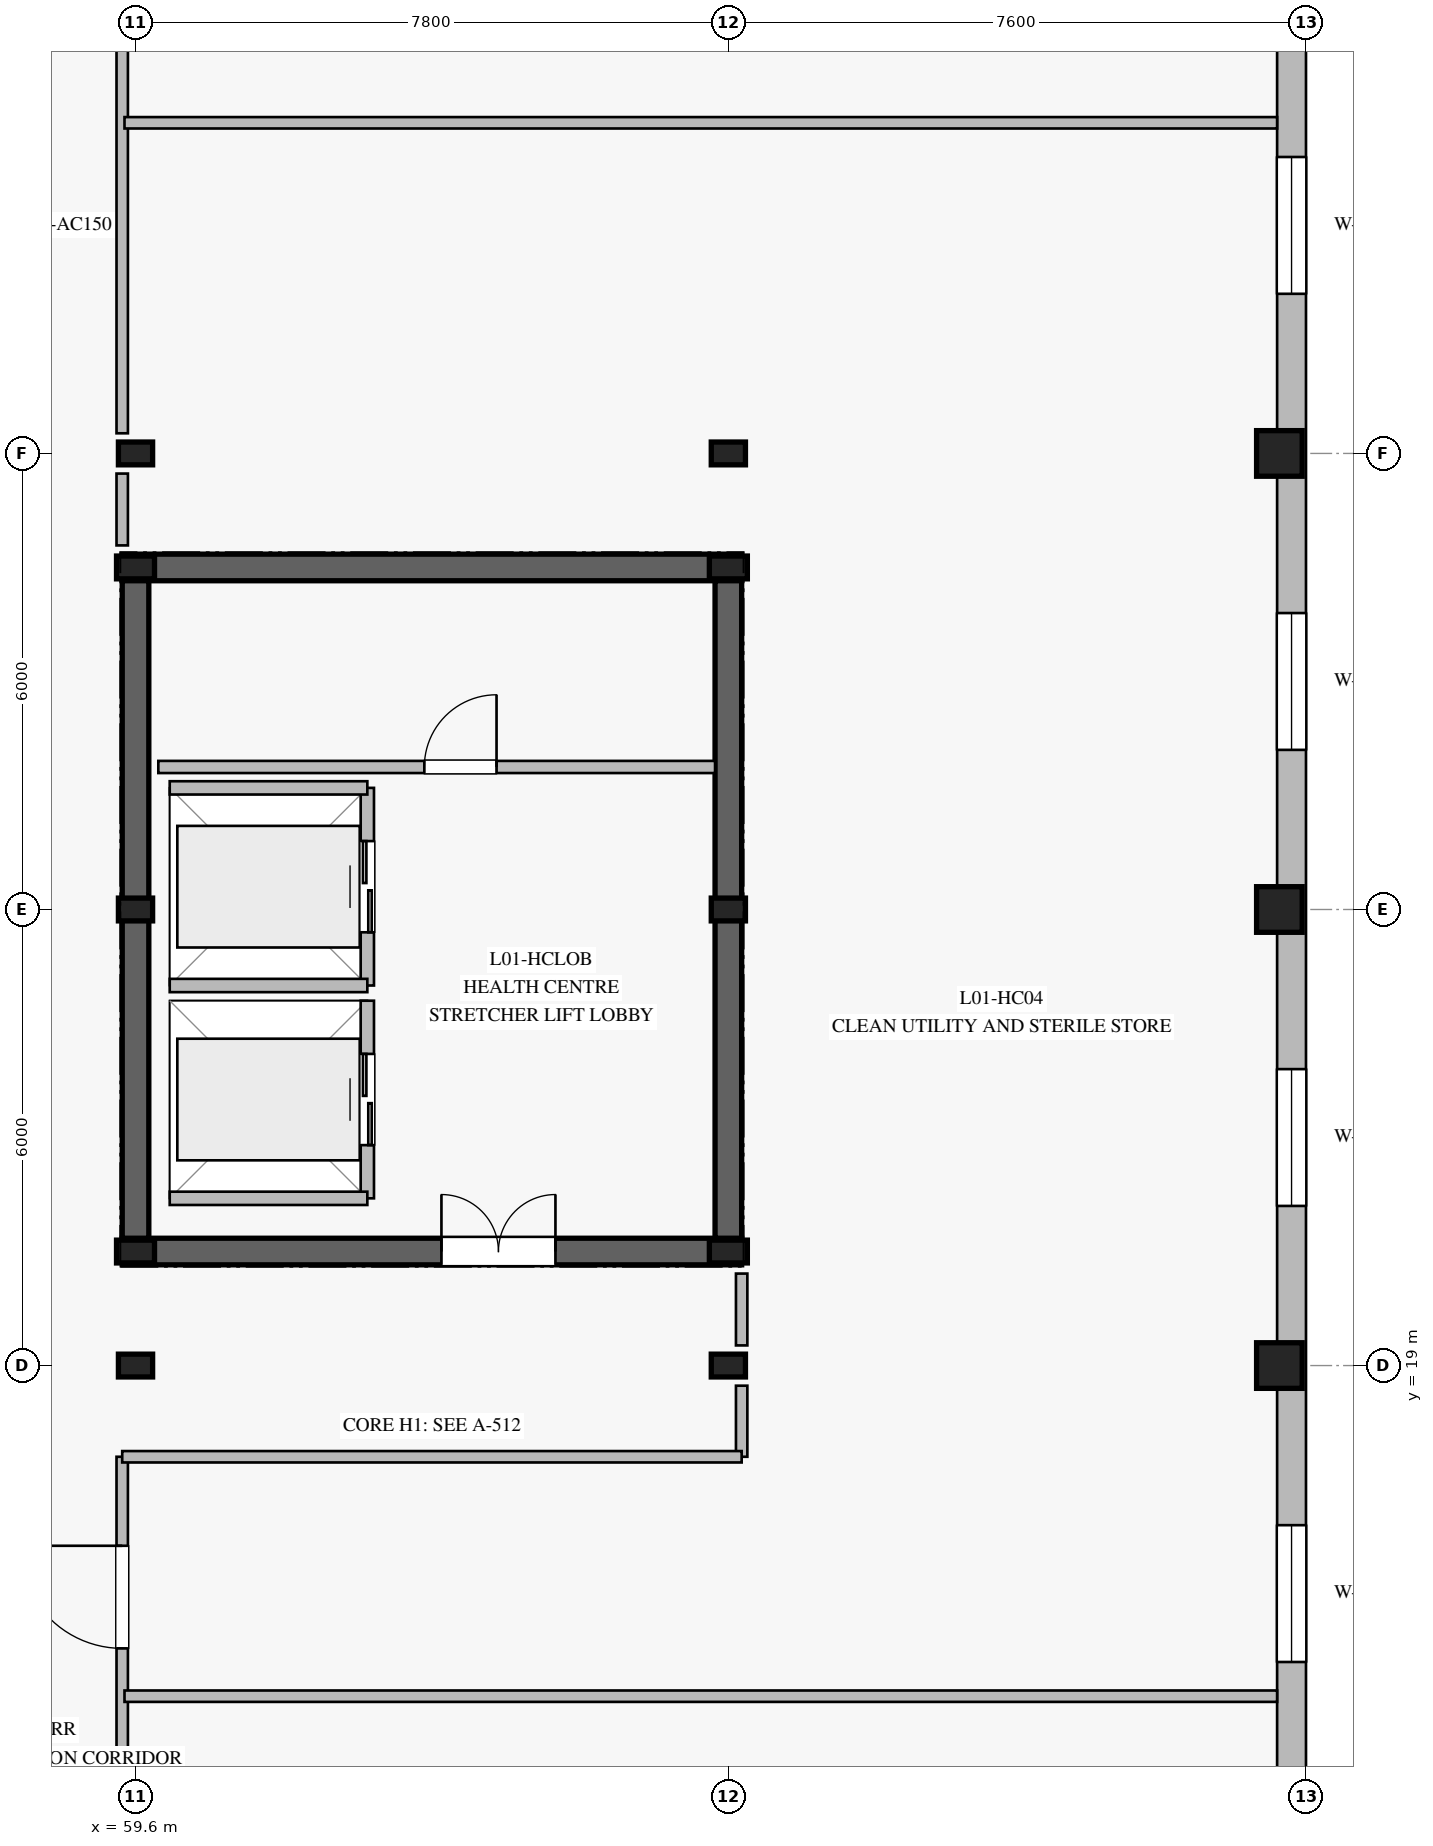
"""IFC4 building model, lengths in metres.
Left out: names, types, materials, properties, quantities, classifications, styles, units other than length and angle.
Written with IfcOpenShell. Run it as: python <this file> out.ifc"""

import sys

from ifc_helpers import new_model, si_unit, direction, frame, frame_2d, origin, origin_2d, place, context, subcontext, project, spatial, rectangle, i_section, extrude, element, fill, save


model = new_model("IFC4")
c1 = context("Model", 3, precision=1e-05, world=origin(), true_north=direction((0.0, 1.0)))
c2 = subcontext(c1, "Body", "Model", "MODEL_VIEW")
j1 = project(units=[si_unit("LENGTHUNIT", "METRE"), si_unit("PLANEANGLEUNIT", "RADIAN")], contexts=[c1])
p1 = place(None, origin())
s1 = spatial("IfcSite", under=j1, at=p1, CompositionType="ELEMENT")
p2 = place(p1, origin())
s2 = spatial("IfcBuilding", under=s1, at=p2, CompositionType="ELEMENT")
p3 = place(p2, frame((0.0, 0.0, 5.2)))
s3 = spatial("IfcBuildingStorey", under=s2, at=p3, CompositionType="ELEMENT", Elevation=5.2)
p4 = place(p3, frame((59.425, 20.5, 0.0), z_axis=(0.0, 0.0, 1.0), x_axis=(1.0, 0.0, 0.0)))
e1 = element("IfcWall", 1, at=p4, inside=s3, PredefinedType="SHEAR", context=c2, shape_type="SweptSolid", body=[
    extrude(rectangle(XDim=8.15, YDim=0.35, at=frame_2d((4.075, 0.0))), origin(), (0.0, 0.0, 1.0), 4.34),
])
p5 = place(p4, frame((4.2, 0.0, 0.0)))
e2 = element("IfcOpeningElement", 2, at=p5, cuts=e1, PredefinedType="OPENING", context=c2, shape_type="SweptSolid", body=[
    extrude(rectangle(XDim=1.5, YDim=2.2, at=frame_2d((0.75, 1.1))), frame((0.0, 0.185, 0.0), z_axis=(0.0, -1.0, 0.0), x_axis=(1.0, 0.0, 0.0)), (0.0, 0.0, 1.0), 0.37),
])
p6 = place(p3, frame((67.575, 29.5, 0.0), z_axis=(0.0, 0.0, 1.0), x_axis=(-1.0, 0.0, 0.0)))
e3 = element("IfcWall", 3, at=p6, inside=s3, PredefinedType="SHEAR", context=c2, shape_type="SweptSolid", body=[
    extrude(rectangle(XDim=8.15, YDim=0.35, at=frame_2d((4.075, 0.0))), origin(), (0.0, 0.0, 1.0), 4.34),
])
for number, where, z_axis, x_axis in (
    (4, (59.6, 29.325, 0.0), (0.0, 0.0, 1.0), (0.0, -1.0, 0.0)),
    (5, (67.4, 20.675, 0.0), (0.0, 0.0, 1.0), (0.0, 1.0, 0.0)),
):
    element("IfcWall", number, at=place(p3, frame(where, z_axis=z_axis, x_axis=x_axis)), inside=s3, PredefinedType="SHEAR", context=c2, shape_type="SweptSolid", body=[
        extrude(rectangle(XDim=8.65, YDim=0.35, at=frame_2d((4.325, 0.0))), origin(), (0.0, 0.0, 1.0), 4.34),
    ])
for number, where, z_axis, x_axis in (
    (6, (59.6, 20.5, 0.0), (0.0, 0.0, 1.0), (1.0, 0.0, 0.0)),
    (7, (67.4, 20.5, 0.0), (0.0, 0.0, 1.0), (1.0, 0.0, 0.0)),
    (8, (67.4, 29.5, 0.0), (0.0, 0.0, 1.0), (1.0, 0.0, 0.0)),
    (9, (59.6, 29.5, 0.0), (0.0, 0.0, 1.0), (1.0, 0.0, 0.0)),
):
    element("IfcColumn", number, at=place(p3, frame(where, z_axis=z_axis, x_axis=x_axis)), inside=s3, PredefinedType="COLUMN", context=c2, shape_type="SweptSolid", body=[
        extrude(i_section(OverallWidth=0.3, OverallDepth=0.5, WebThickness=0.014, FlangeThickness=0.028, at=origin_2d()), origin(), (0.0, 0.0, 1.0), 4.6),
    ])
for number, where, z_axis, x_axis in (
    (10, (59.6, 19.0, 0.0), (0.0, 0.0, 1.0), (1.0, 0.0, 0.0)),
    (11, (59.6, 25.0, 0.0), (0.0, 0.0, 1.0), (1.0, 0.0, 0.0)),
    (12, (59.6, 31.0, 0.0), (0.0, 0.0, 1.0), (1.0, 0.0, 0.0)),
    (13, (67.4, 19.0, 0.0), (0.0, 0.0, 1.0), (1.0, 0.0, 0.0)),
    (14, (67.4, 25.0, 0.0), (0.0, 0.0, 1.0), (1.0, 0.0, 0.0)),
    (15, (67.4, 31.0, 0.0), (0.0, 0.0, 1.0), (1.0, 0.0, 0.0)),
):
    element("IfcColumn", number, at=place(p3, frame(where, z_axis=z_axis, x_axis=x_axis)), inside=s3, PredefinedType="COLUMN", context=c2, shape_type="SweptSolid", body=[
        extrude(i_section(OverallWidth=0.3, OverallDepth=0.45, WebThickness=0.014, FlangeThickness=0.026, at=origin_2d()), origin(), (0.0, 0.0, 1.0), 4.6),
    ])
for number, where, z_axis, x_axis in (
    (16, (74.65, 19.0, 0.0), (0.0, 0.0, 1.0), (1.0, 0.0, 0.0)),
    (17, (74.65, 25.0, 0.0), (0.0, 0.0, 1.0), (1.0, 0.0, 0.0)),
    (18, (74.65, 31.0, 0.0), (0.0, 0.0, 1.0), (1.0, 0.0, 0.0)),
):
    element("IfcColumn", number, at=place(p3, frame(where, z_axis=z_axis, x_axis=x_axis)), inside=s3, PredefinedType="COLUMN", context=c2, shape_type="SweptSolid", body=[
        extrude(rectangle(XDim=0.6, YDim=0.6, at=origin_2d()), origin(), (0.0, 0.0, 1.0), 4.6),
    ])
p7 = place(p3, frame((74.81, 42.62, 0.0), z_axis=(0.0, 0.0, 1.0), x_axis=(0.0, -1.0, 0.0)))
e19 = element("IfcWall", 19, at=p7, inside=s3, PredefinedType="STANDARD", context=c2, shape_type="SweptSolid", body=[
    extrude(rectangle(XDim=35.24, YDim=0.38, at=frame_2d((17.62, 0.0))), origin(), (0.0, 0.0, 1.0), 4.34),
])
p8 = place(p7, frame((31.52, 0.0, 0.9)))
e20 = element("IfcOpeningElement", 20, at=p8, cuts=e19, PredefinedType="OPENING", context=c2, shape_type="SweptSolid", body=[
    extrude(rectangle(XDim=1.8, YDim=1.8, at=frame_2d((0.9, 0.9))), frame((0.0, 0.2, 0.0), z_axis=(0.0, -1.0, 0.0), x_axis=(1.0, 0.0, 0.0)), (0.0, 0.0, 1.0), 0.4),
])
p9 = place(p7, frame((25.72, 0.0, 0.9)))
e21 = element("IfcOpeningElement", 21, at=p9, cuts=e19, PredefinedType="OPENING", context=c2, shape_type="SweptSolid", body=[
    extrude(rectangle(XDim=1.8, YDim=1.8, at=frame_2d((0.9, 0.9))), frame((0.0, 0.2, 0.0), z_axis=(0.0, -1.0, 0.0), x_axis=(1.0, 0.0, 0.0)), (0.0, 0.0, 1.0), 0.4),
])
p10 = place(p7, frame((19.72, 0.0, 0.9)))
e22 = element("IfcOpeningElement", 22, at=p10, cuts=e19, PredefinedType="OPENING", context=c2, shape_type="SweptSolid", body=[
    extrude(rectangle(XDim=1.8, YDim=1.8, at=frame_2d((0.9, 0.9))), frame((0.0, 0.2, 0.0), z_axis=(0.0, -1.0, 0.0), x_axis=(1.0, 0.0, 0.0)), (0.0, 0.0, 1.0), 0.4),
])
p11 = place(p7, frame((13.72, 0.0, 0.9)))
e23 = element("IfcOpeningElement", 23, at=p11, cuts=e19, PredefinedType="OPENING", context=c2, shape_type="SweptSolid", body=[
    extrude(rectangle(XDim=1.8, YDim=1.8, at=frame_2d((0.9, 0.9))), frame((0.0, 0.2, 0.0), z_axis=(0.0, -1.0, 0.0), x_axis=(1.0, 0.0, 0.0)), (0.0, 0.0, 1.0), 0.4),
])
p12 = place(p7, frame((7.72, 0.0, 0.9)))
e24 = element("IfcOpeningElement", 24, at=p12, cuts=e19, PredefinedType="OPENING", context=c2, shape_type="SweptSolid", body=[
    extrude(rectangle(XDim=1.8, YDim=1.8, at=frame_2d((0.9, 0.9))), frame((0.0, 0.2, 0.0), z_axis=(0.0, -1.0, 0.0), x_axis=(1.0, 0.0, 0.0)), (0.0, 0.0, 1.0), 0.4),
])
p13 = place(p7, frame((1.92, 0.0, 0.9)))
e25 = element("IfcOpeningElement", 25, at=p13, cuts=e19, PredefinedType="OPENING", context=c2, shape_type="SweptSolid", body=[
    extrude(rectangle(XDim=1.8, YDim=1.8, at=frame_2d((0.9, 0.9))), frame((0.0, 0.2, 0.0), z_axis=(0.0, -1.0, 0.0), x_axis=(1.0, 0.0, 0.0)), (0.0, 0.0, 1.0), 0.4),
])
p14 = place(p3, frame((62.65, 21.2, 0.0), z_axis=(0.0, 0.0, 1.0), x_axis=(0.0, 1.0, 0.0)))
e26 = element("IfcWall", 26, at=p14, inside=s3, PredefinedType="PARTITIONING", context=c2, shape_type="SweptSolid", body=[
    extrude(rectangle(XDim=2.6, YDim=0.175, at=frame_2d((1.3, 0.0))), origin(), (0.0, 0.0, 1.0), 4.34),
])
p15 = place(p14, frame((0.7, 0.0, 0.0)))
e27 = element("IfcOpeningElement", 27, at=p15, cuts=e26, PredefinedType="OPENING", context=c2, shape_type="SweptSolid", body=[
    extrude(rectangle(XDim=1.2, YDim=2.2, at=frame_2d((0.6, 1.1))), frame((0.0, 0.098, 0.0), z_axis=(0.0, -1.0, 0.0), x_axis=(1.0, 0.0, 0.0)), (0.0, 0.0, 1.0), 0.195),
])
p16 = place(p3, frame((60.05, 21.2, 0.0), z_axis=(0.0, 0.0, 1.0), x_axis=(1.0, 0.0, 0.0)))
e28 = element("IfcWall", 28, at=p16, inside=s3, PredefinedType="PARTITIONING", context=c2, shape_type="SweptSolid", body=[
    extrude(rectangle(XDim=2.6, YDim=0.175, at=frame_2d((1.3, 0.0))), origin(), (0.0, 0.0, 1.0), 4.34),
])
p17 = place(p3, frame((62.65, 24.0, 0.0), z_axis=(0.0, 0.0, 1.0), x_axis=(0.0, 1.0, 0.0)))
e29 = element("IfcWall", 29, at=p17, inside=s3, PredefinedType="PARTITIONING", context=c2, shape_type="SweptSolid", body=[
    extrude(rectangle(XDim=2.6, YDim=0.175, at=frame_2d((1.3, 0.0))), origin(), (0.0, 0.0, 1.0), 3.98),
])
p18 = place(p17, frame((0.7, 0.0, 0.0)))
e30 = element("IfcOpeningElement", 30, at=p18, cuts=e29, PredefinedType="OPENING", context=c2, shape_type="SweptSolid", body=[
    extrude(rectangle(XDim=1.2, YDim=2.2, at=frame_2d((0.6, 1.1))), frame((0.0, 0.098, 0.0), z_axis=(0.0, -1.0, 0.0), x_axis=(1.0, 0.0, 0.0)), (0.0, 0.0, 1.0), 0.195),
])
for number, where, z_axis, x_axis in (
    (31, (60.05, 24.0, 0.0), (0.0, 0.0, 1.0), (1.0, 0.0, 0.0)),
    (32, (60.05, 26.6, 0.0), (0.0, 0.0, 1.0), (1.0, 0.0, 0.0)),
):
    element("IfcWall", number, at=place(p3, frame(where, z_axis=z_axis, x_axis=x_axis)), inside=s3, PredefinedType="PARTITIONING", context=c2, shape_type="SweptSolid", body=[
        extrude(rectangle(XDim=2.6, YDim=0.175, at=frame_2d((1.3, 0.0))), origin(), (0.0, 0.0, 1.0), 4.34),
    ])
p19 = place(p3, frame((59.9, 26.875, 0.0), z_axis=(0.0, 0.0, 1.0), x_axis=(1.0, 0.0, 0.0)))
e33 = element("IfcWall", 33, at=p19, inside=s3, PredefinedType="PLUMBINGWALL", context=c2, shape_type="SweptSolid", body=[
    extrude(rectangle(XDim=7.325, YDim=0.16, at=frame_2d((3.663, 0.0))), origin(), (0.0, 0.0, 1.0), 3.98),
])
p20 = place(p19, frame((3.5, 0.0, 0.0)))
e34 = element("IfcOpeningElement", 34, at=p20, cuts=e33, PredefinedType="OPENING", context=c2, shape_type="SweptSolid", body=[
    extrude(rectangle(XDim=0.95, YDim=2.1, at=frame_2d((0.475, 1.05))), frame((0.0, 0.09, 0.0), z_axis=(0.0, -1.0, 0.0), x_axis=(1.0, 0.0, 0.0)), (0.0, 0.0, 1.0), 0.18),
])
p21 = place(p3, frame((59.425, 13.265, 0.0), z_axis=(0.0, 0.0, 1.0), x_axis=(0.0, 1.0, 0.0)))
e35 = element("IfcWall", 35, at=p21, inside=s3, PredefinedType="PARTITIONING", context=c2, shape_type="SweptSolid", body=[
    extrude(rectangle(XDim=4.535, YDim=0.15, at=frame_2d((2.268, 0.0))), origin(), (0.0, 0.0, 1.0), 3.98),
])
p22 = place(p21, frame((2.014, 0.0, 0.0)))
e36 = element("IfcOpeningElement", 36, at=p22, cuts=e35, PredefinedType="OPENING", context=c2, shape_type="SweptSolid", body=[
    extrude(rectangle(XDim=1.35, YDim=2.2, at=frame_2d((0.675, 1.1))), frame((0.0, 0.085, 0.0), z_axis=(0.0, -1.0, 0.0), x_axis=(1.0, 0.0, 0.0)), (0.0, 0.0, 1.0), 0.17),
])
p23 = place(p3, frame((59.425, 29.79, 0.0), z_axis=(0.0, 0.0, 1.0), x_axis=(0.0, 1.0, 0.0)))
e37 = element("IfcWall", 37, at=p23, inside=s3, PredefinedType="PARTITIONING", context=c2, shape_type="SweptSolid", body=[
    extrude(rectangle(XDim=0.945, YDim=0.15, at=frame_2d((0.473, 0.0))), origin(), (0.0, 0.0, 1.0), 3.98),
])
p24 = place(p3, frame((59.425, 31.265, 0.0), z_axis=(0.0, 0.0, 1.0), x_axis=(0.0, 1.0, 0.0)))
e38 = element("IfcWall", 38, at=p24, inside=s3, PredefinedType="PARTITIONING", context=c2, shape_type="SweptSolid", body=[
    extrude(rectangle(XDim=5.47, YDim=0.15, at=frame_2d((2.735, 0.0))), origin(), (0.0, 0.0, 1.0), 3.98),
])
p25 = place(p3, frame((67.575, 17.8, 0.0), z_axis=(0.0, 0.0, 1.0), x_axis=(0.0, 1.0, 0.0)))
e39 = element("IfcWall", 39, at=p25, inside=s3, PredefinedType="PARTITIONING", context=c2, shape_type="SweptSolid", body=[
    extrude(rectangle(XDim=0.935, YDim=0.15, at=frame_2d((0.468, 0.0))), origin(), (0.0, 0.0, 1.0), 3.98),
])
p26 = place(p3, frame((67.575, 19.265, 0.0), z_axis=(0.0, 0.0, 1.0), x_axis=(0.0, 1.0, 0.0)))
e40 = element("IfcWall", 40, at=p26, inside=s3, PredefinedType="PARTITIONING", context=c2, shape_type="SweptSolid", body=[
    extrude(rectangle(XDim=0.945, YDim=0.15, at=frame_2d((0.473, 0.0))), origin(), (0.0, 0.0, 1.0), 3.98),
])
p27 = place(p3, frame((59.425, 17.8, 0.0), z_axis=(0.0, 0.0, 1.0), x_axis=(1.0, 0.0, 0.0)))
e41 = element("IfcWall", 41, at=p27, inside=s3, PredefinedType="PARTITIONING", context=c2, shape_type="SweptSolid", body=[
    extrude(rectangle(XDim=8.15, YDim=0.15, at=frame_2d((4.075, 0.0))), origin(), (0.0, 0.0, 1.0), 3.98),
])
for number, where, z_axis, x_axis in (
    (42, (59.455, 14.65, 0.0), (0.0, 0.0, 1.0), (1.0, 0.0, 0.0)),
    (43, (59.455, 35.35, 0.0), (0.0, 0.0, 1.0), (1.0, 0.0, 0.0)),
):
    element("IfcWall", number, at=place(p3, frame(where, z_axis=z_axis, x_axis=x_axis)), inside=s3, PredefinedType="PARTITIONING", context=c2, shape_type="SweptSolid", body=[
        extrude(rectangle(XDim=15.165, YDim=0.15, at=frame_2d((7.583, 0.0))), origin(), (0.0, 0.0, 1.0), 3.98),
    ])
p28 = place(p9, origin())
e44 = element("IfcWindow", 44, at=p28, inside=s3, PartitioningType="DOUBLE_PANEL_VERTICAL", PredefinedType="WINDOW", context=c2, shape_type="SweptSolid", body=[
    extrude(rectangle(XDim=1.8, YDim=1.8, at=frame_2d((0.9, 0.9))), frame((0.0, 0.03, 0.0), z_axis=(0.0, -1.0, 0.0), x_axis=(1.0, 0.0, 0.0)), (0.0, 0.0, 1.0), 0.06),
])
fill(e21, e44)
p29 = place(p10, origin())
e45 = element("IfcWindow", 45, at=p29, inside=s3, PartitioningType="DOUBLE_PANEL_VERTICAL", PredefinedType="WINDOW", context=c2, shape_type="SweptSolid", body=[
    extrude(rectangle(XDim=1.8, YDim=1.8, at=frame_2d((0.9, 0.9))), frame((0.0, 0.03, 0.0), z_axis=(0.0, -1.0, 0.0), x_axis=(1.0, 0.0, 0.0)), (0.0, 0.0, 1.0), 0.06),
])
fill(e22, e45)
p30 = place(p11, origin())
e46 = element("IfcWindow", 46, at=p30, inside=s3, PartitioningType="DOUBLE_PANEL_VERTICAL", PredefinedType="WINDOW", context=c2, shape_type="SweptSolid", body=[
    extrude(rectangle(XDim=1.8, YDim=1.8, at=frame_2d((0.9, 0.9))), frame((0.0, 0.03, 0.0), z_axis=(0.0, -1.0, 0.0), x_axis=(1.0, 0.0, 0.0)), (0.0, 0.0, 1.0), 0.06),
])
fill(e23, e46)
p31 = place(p12, origin())
e47 = element("IfcWindow", 47, at=p31, inside=s3, PartitioningType="DOUBLE_PANEL_VERTICAL", PredefinedType="WINDOW", context=c2, shape_type="SweptSolid", body=[
    extrude(rectangle(XDim=1.8, YDim=1.8, at=frame_2d((0.9, 0.9))), frame((0.0, 0.03, 0.0), z_axis=(0.0, -1.0, 0.0), x_axis=(1.0, 0.0, 0.0)), (0.0, 0.0, 1.0), 0.06),
])
fill(e24, e47)
p32 = place(p15, origin())
e48 = element("IfcDoor", 48, at=p32, inside=s3, OperationType="DOUBLE_DOOR_SLIDING", PredefinedType="DOOR", context=c2, shape_type="SweptSolid", body=[
    extrude(rectangle(XDim=1.2, YDim=2.2, at=frame_2d((0.6, 1.1))), frame((0.0, 0.025, 0.0), z_axis=(0.0, -1.0, 0.0), x_axis=(1.0, 0.0, 0.0)), (0.0, 0.0, 1.0), 0.05),
])
fill(e27, e48)
p33 = place(p18, origin())
e49 = element("IfcDoor", 49, at=p33, inside=s3, OperationType="DOUBLE_DOOR_SLIDING", PredefinedType="DOOR", context=c2, shape_type="SweptSolid", body=[
    extrude(rectangle(XDim=1.2, YDim=2.2, at=frame_2d((0.6, 1.1))), frame((0.0, 0.025, 0.0), z_axis=(0.0, -1.0, 0.0), x_axis=(1.0, 0.0, 0.0)), (0.0, 0.0, 1.0), 0.05),
])
fill(e30, e49)
p34 = place(p5, origin())
e50 = element("IfcDoor", 50, at=p34, inside=s3, OperationType="DOUBLE_DOOR_SINGLE_SWING", PredefinedType="DOOR", context=c2, shape_type="SweptSolid", body=[
    extrude(rectangle(XDim=1.5, YDim=2.2, at=frame_2d((0.75, 1.1))), frame((0.0, 0.025, 0.0), z_axis=(0.0, -1.0, 0.0), x_axis=(1.0, 0.0, 0.0)), (0.0, 0.0, 1.0), 0.05),
])
fill(e2, e50)
p35 = place(p20, origin())
e51 = element("IfcDoor", 51, at=p35, inside=s3, OperationType="SINGLE_SWING_RIGHT", PredefinedType="DOOR", context=c2, shape_type="SweptSolid", body=[
    extrude(rectangle(XDim=0.95, YDim=2.1, at=frame_2d((0.475, 1.05))), frame((0.0, 0.025, 0.0), z_axis=(0.0, -1.0, 0.0), x_axis=(1.0, 0.0, 0.0)), (0.0, 0.0, 1.0), 0.05),
])
fill(e34, e51)
p36 = place(p22, origin())
e52 = element("IfcDoor", 52, at=p36, inside=s3, OperationType="SINGLE_SWING_RIGHT", PredefinedType="DOOR", context=c2, shape_type="SweptSolid", body=[
    extrude(rectangle(XDim=1.35, YDim=2.2, at=frame_2d((0.675, 1.1))), frame((0.0, 0.025, 0.0), z_axis=(0.0, -1.0, 0.0), x_axis=(1.0, 0.0, 0.0)), (0.0, 0.0, 1.0), 0.05),
])
fill(e36, e52)
save(model, sys.argv[1])
